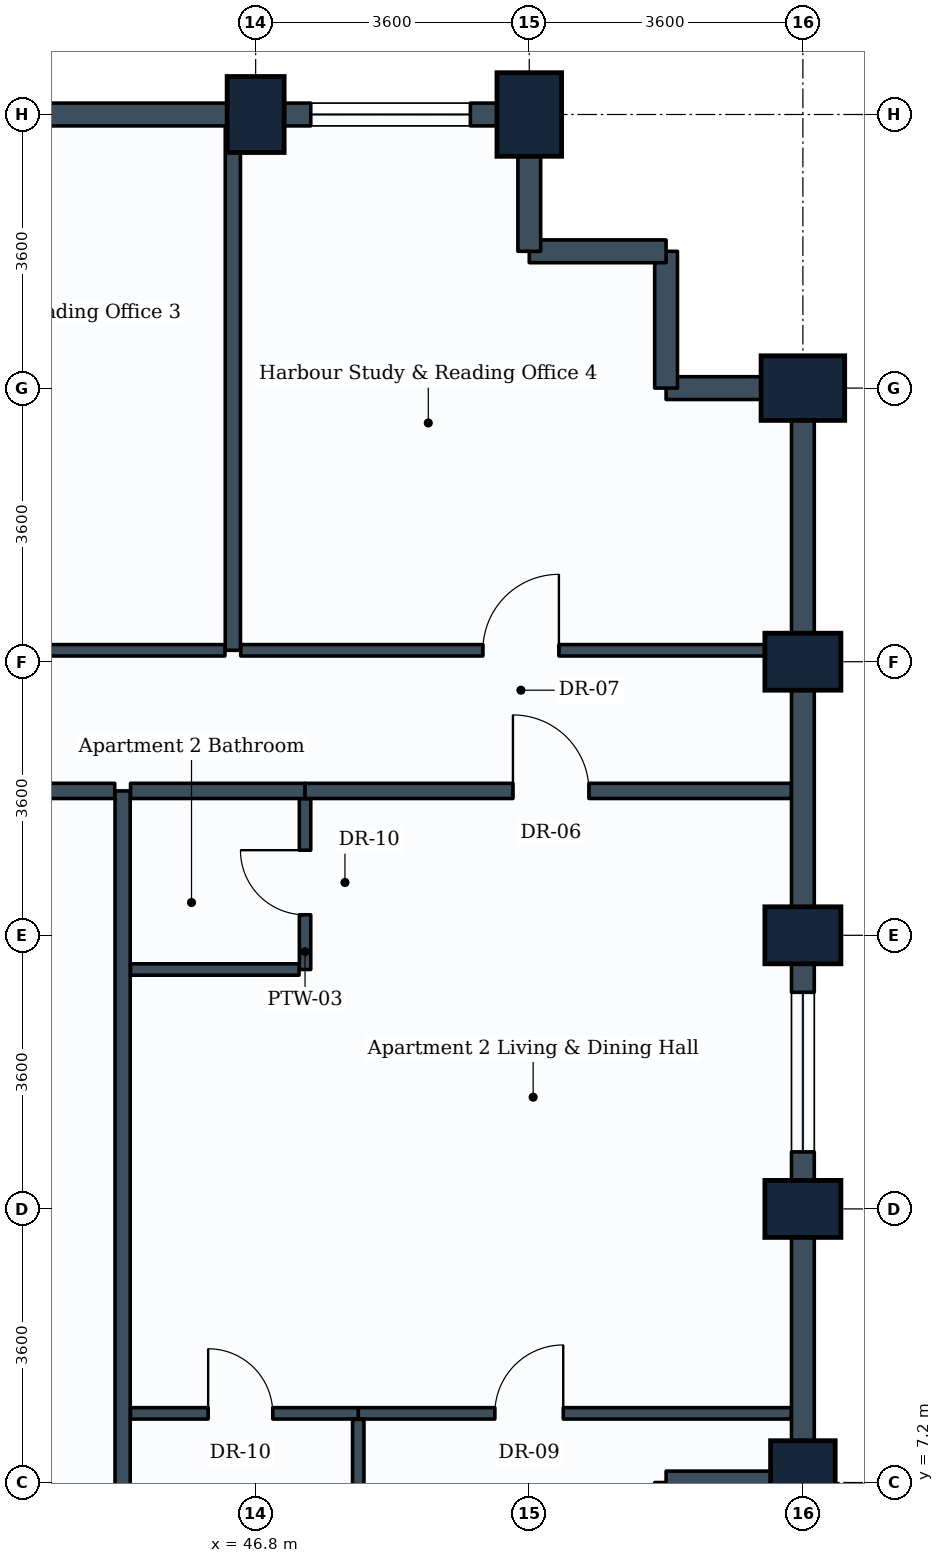
"""IFC4 building model, lengths in metres.
Left out: names, types, materials, properties, quantities, classifications, styles, units other than length and angle.
Written with IfcOpenShell. Run it as: python <this file> out.ifc"""

import sys

from ifc_helpers import new_model, si_unit, direction, frame, frame_2d, origin, origin_2d, place, context, subcontext, project, spatial, rectangle, extrude, element, fill, save


model = new_model("IFC4")
c1 = context("Model", 3, precision=1e-05, world=origin(), true_north=direction((0.0, 1.0)))
c2 = subcontext(c1, "Body", "Model", "MODEL_VIEW")
j1 = project(units=[si_unit("LENGTHUNIT", "METRE"), si_unit("PLANEANGLEUNIT", "RADIAN")], contexts=[c1])
p1 = place(None, origin())
s1 = spatial("IfcSite", under=j1, at=p1, CompositionType="ELEMENT")
p2 = place(p1, origin())
s2 = spatial("IfcBuilding", under=s1, at=p2, CompositionType="ELEMENT")
p3 = place(p2, frame((0.0, 0.0, 161.8)))
s3 = spatial("IfcBuildingStorey", under=s2, at=p3, CompositionType="ELEMENT", Elevation=161.8)
p4 = place(p3, frame((46.8, 25.2, 0.0), z_axis=(0.0, 0.0, 1.0), x_axis=(1.0, 0.0, 0.0)))
e1 = element("IfcColumn", 1, at=p4, inside=s3, PredefinedType="COLUMN", context=c2, shape_type="SweptSolid", body=[
    extrude(rectangle(XDim=0.75, YDim=1.0, at=origin_2d()), origin(), (0.0, 0.0, 1.0), 3.8),
])
for number, where, z_axis, x_axis in (
    (2, (50.4, 25.2, 0.0), (0.0, 0.0, 1.0), (1.0, 0.0, 0.0)),
    (3, (54.0, 7.2, 0.0), (0.0, 0.0, 1.0), (1.0, 0.0, 0.0)),
):
    element("IfcColumn", number, at=place(p3, frame(where, z_axis=z_axis, x_axis=x_axis)), inside=s3, PredefinedType="COLUMN", context=c2, shape_type="SweptSolid", body=[
        extrude(rectangle(XDim=0.85, YDim=1.1, at=origin_2d()), origin(), (0.0, 0.0, 1.0), 3.8),
    ])
for number, where, z_axis, x_axis in (
    (4, (54.0, 10.8, 0.0), (0.0, 0.0, 1.0), (0.0, 1.0, 0.0)),
    (5, (54.0, 14.4, 0.0), (0.0, 0.0, 1.0), (0.0, 1.0, 0.0)),
    (6, (54.0, 18.0, 0.0), (0.0, 0.0, 1.0), (0.0, 1.0, 0.0)),
):
    element("IfcColumn", number, at=place(p3, frame(where, z_axis=z_axis, x_axis=x_axis)), inside=s3, PredefinedType="COLUMN", context=c2, shape_type="SweptSolid", body=[
        extrude(rectangle(XDim=0.75, YDim=1.0, at=origin_2d()), origin(), (0.0, 0.0, 1.0), 3.8),
    ])
p5 = place(p3, frame((54.0, 21.6, 0.0), z_axis=(0.0, 0.0, 1.0), x_axis=(0.0, 1.0, 0.0)))
e7 = element("IfcColumn", 7, at=p5, inside=s3, PredefinedType="COLUMN", context=c2, shape_type="SweptSolid", body=[
    extrude(rectangle(XDim=0.85, YDim=1.1, at=origin_2d()), origin(), (0.0, 0.0, 1.0), 3.8),
])
p6 = place(p3, frame((52.2, 7.2, 0.0), z_axis=(0.0, 0.0, 1.0), x_axis=(0.0, -1.0, 0.0)))
e8 = element("IfcWall", 8, at=p6, inside=s3, PredefinedType="STANDARD", context=c2, shape_type="SweptSolid", body=[
    extrude(rectangle(XDim=1.8, YDim=0.3, at=frame_2d((0.9, 0.0))), origin(), (0.0, 0.0, 1.0), 3.535),
])
p7 = place(p3, frame((54.0, 7.2, 0.0), z_axis=(0.0, 0.0, 1.0), x_axis=(-1.0, 0.0, 0.0)))
e9 = element("IfcWall", 9, at=p7, inside=s3, PredefinedType="STANDARD", context=c2, shape_type="SweptSolid", body=[
    extrude(rectangle(XDim=1.8, YDim=0.3, at=frame_2d((0.9, 0.0))), origin(), (0.0, 0.0, 1.0), 2.93),
])
p8 = place(p3, frame((54.0, 10.8, 0.0), z_axis=(0.0, 0.0, 1.0), x_axis=(0.0, -1.0, 0.0)))
e10 = element("IfcWall", 10, at=p8, inside=s3, PredefinedType="STANDARD", context=c2, shape_type="SweptSolid", body=[
    extrude(rectangle(XDim=3.6, YDim=0.3, at=frame_2d((1.8, 0.0))), origin(), (0.0, 0.0, 1.0), 2.93),
])
p9 = place(p3, frame((54.0, 14.4, 0.0), z_axis=(0.0, 0.0, 1.0), x_axis=(0.0, -1.0, 0.0)))
e11 = element("IfcWall", 11, at=p9, inside=s3, PredefinedType="STANDARD", context=c2, shape_type="SweptSolid", body=[
    extrude(rectangle(XDim=3.6, YDim=0.3, at=frame_2d((1.8, 0.0))), origin(), (0.0, 0.0, 1.0), 2.93),
])
p10 = place(p9, frame((0.75, 0.0, 0.85)))
e12 = element("IfcOpeningElement", 12, at=p10, cuts=e11, PredefinedType="OPENING", context=c2, shape_type="SweptSolid", body=[
    extrude(rectangle(XDim=2.1, YDim=1.35, at=frame_2d((1.05, 0.675))), frame((0.0, 0.16, 0.0), z_axis=(0.0, -1.0, 0.0), x_axis=(1.0, 0.0, 0.0)), (0.0, 0.0, 1.0), 0.32),
])
for number, where, z_axis, x_axis in (
    (13, (54.0, 18.0, 0.0), (0.0, 0.0, 1.0), (0.0, -1.0, 0.0)),
    (14, (54.0, 21.6, 0.0), (0.0, 0.0, 1.0), (0.0, -1.0, 0.0)),
):
    element("IfcWall", number, at=place(p3, frame(where, z_axis=z_axis, x_axis=x_axis)), inside=s3, PredefinedType="STANDARD", context=c2, shape_type="SweptSolid", body=[
        extrude(rectangle(XDim=3.6, YDim=0.3, at=frame_2d((1.8, 0.0))), origin(), (0.0, 0.0, 1.0), 2.93),
    ])
p11 = place(p3, frame((52.2, 21.6, 0.0), z_axis=(0.0, 0.0, 1.0), x_axis=(1.0, 0.0, 0.0)))
e15 = element("IfcWall", 15, at=p11, inside=s3, PredefinedType="STANDARD", context=c2, shape_type="SweptSolid", body=[
    extrude(rectangle(XDim=1.8, YDim=0.3, at=frame_2d((0.9, 0.0))), origin(), (0.0, 0.0, 1.0), 2.93),
])
p12 = place(p3, frame((52.2, 23.4, 0.0), z_axis=(0.0, 0.0, 1.0), x_axis=(0.0, -1.0, 0.0)))
e16 = element("IfcWall", 16, at=p12, inside=s3, PredefinedType="STANDARD", context=c2, shape_type="SweptSolid", body=[
    extrude(rectangle(XDim=1.8, YDim=0.3, at=frame_2d((0.9, 0.0))), origin(), (0.0, 0.0, 1.0), 3.535),
])
p13 = place(p3, frame((50.4, 23.4, 0.0), z_axis=(0.0, 0.0, 1.0), x_axis=(1.0, 0.0, 0.0)))
e17 = element("IfcWall", 17, at=p13, inside=s3, PredefinedType="STANDARD", context=c2, shape_type="SweptSolid", body=[
    extrude(rectangle(XDim=1.8, YDim=0.3, at=frame_2d((0.9, 0.0))), origin(), (0.0, 0.0, 1.0), 3.535),
])
p14 = place(p3, frame((50.4, 25.2, 0.0), z_axis=(0.0, 0.0, 1.0), x_axis=(0.0, -1.0, 0.0)))
e18 = element("IfcWall", 18, at=p14, inside=s3, PredefinedType="STANDARD", context=c2, shape_type="SweptSolid", body=[
    extrude(rectangle(XDim=1.8, YDim=0.3, at=frame_2d((0.9, 0.0))), origin(), (0.0, 0.0, 1.0), 2.93),
])
p15 = place(p3, frame((46.8, 25.2, 0.0), z_axis=(0.0, 0.0, 1.0), x_axis=(1.0, 0.0, 0.0)))
e19 = element("IfcWall", 19, at=p15, inside=s3, PredefinedType="STANDARD", context=c2, shape_type="SweptSolid", body=[
    extrude(rectangle(XDim=3.6, YDim=0.3, at=frame_2d((1.8, 0.0))), origin(), (0.0, 0.0, 1.0), 2.93),
])
p16 = place(p15, frame((0.725, 0.0, 0.85)))
e20 = element("IfcOpeningElement", 20, at=p16, cuts=e19, PredefinedType="OPENING", context=c2, shape_type="SweptSolid", body=[
    extrude(rectangle(XDim=2.1, YDim=1.35, at=frame_2d((1.05, 0.675))), frame((0.0, 0.16, 0.0), z_axis=(0.0, -1.0, 0.0), x_axis=(1.0, 0.0, 0.0)), (0.0, 0.0, 1.0), 0.32),
])
p17 = place(p3, frame((43.2, 25.2, 0.0), z_axis=(0.0, 0.0, 1.0), x_axis=(1.0, 0.0, 0.0)))
e21 = element("IfcWall", 21, at=p17, inside=s3, PredefinedType="STANDARD", context=c2, shape_type="SweptSolid", body=[
    extrude(rectangle(XDim=3.6, YDim=0.3, at=frame_2d((1.8, 0.0))), origin(), (0.0, 0.0, 1.0), 2.93),
])
p18 = place(p3, frame((45.05, 3.754, 0.0), z_axis=(0.0, 0.0, 1.0), x_axis=(0.0, 1.0, 0.0)))
e22 = element("IfcWall", 22, at=p18, inside=s3, PredefinedType="PARTITIONING", context=c2, shape_type="SweptSolid", body=[
    extrude(rectangle(XDim=12.546, YDim=0.2, at=frame_2d((6.273, 0.0))), origin(), (0.0, 0.0, 1.0), 2.93),
])
p19 = place(p3, frame((36.8, 16.3, 0.0), z_axis=(0.0, 0.0, 1.0), x_axis=(1.0, 0.0, 0.0)))
e23 = element("IfcWall", 23, at=p19, inside=s3, PredefinedType="PARTITIONING", context=c2, shape_type="SweptSolid", body=[
    extrude(rectangle(XDim=8.146, YDim=0.2, at=frame_2d((4.073, 0.0))), origin(), (0.0, 0.0, 1.0), 3.17),
])
p20 = place(p19, frame((2.829, 0.0, 0.0)))
e24 = element("IfcOpeningElement", 24, at=p20, cuts=e23, PredefinedType="OPENING", context=c2, shape_type="SweptSolid", body=[
    extrude(rectangle(XDim=1.0, YDim=2.1, at=frame_2d((0.5, 1.05))), frame((0.0, 0.11, 0.0), z_axis=(0.0, -1.0, 0.0), x_axis=(1.0, 0.0, 0.0)), (0.0, 0.0, 1.0), 0.22),
])
p21 = place(p3, frame((45.154, 16.3, 0.0), z_axis=(0.0, 0.0, 1.0), x_axis=(1.0, 0.0, 0.0)))
e25 = element("IfcWall", 25, at=p21, inside=s3, PredefinedType="PARTITIONING", context=c2, shape_type="SweptSolid", body=[
    extrude(rectangle(XDim=2.296, YDim=0.2, at=frame_2d((1.148, 0.0))), origin(), (0.0, 0.0, 1.0), 3.17),
])
p22 = place(p3, frame((47.45, 13.95, 0.0), z_axis=(0.0, 0.0, 1.0), x_axis=(0.0, 1.0, 0.0)))
e26 = element("IfcWall", 26, at=p22, inside=s3, PredefinedType="PARTITIONING", context=c2, shape_type="SweptSolid", body=[
    extrude(rectangle(XDim=2.246, YDim=0.15, at=frame_2d((1.123, 0.0))), origin(), (0.0, 0.0, 1.0), 3.17),
])
p23 = place(p22, frame((0.72, 0.0, 0.0)))
e27 = element("IfcOpeningElement", 27, at=p23, cuts=e26, PredefinedType="OPENING", context=c2, shape_type="SweptSolid", body=[
    extrude(rectangle(XDim=0.85, YDim=2.1, at=frame_2d((0.425, 1.05))), frame((0.0, 0.085, 0.0), z_axis=(0.0, -1.0, 0.0), x_axis=(1.0, 0.0, 0.0)), (0.0, 0.0, 1.0), 0.17),
])
p24 = place(p3, frame((45.154, 13.95, 0.0), z_axis=(0.0, 0.0, 1.0), x_axis=(1.0, 0.0, 0.0)))
e28 = element("IfcWall", 28, at=p24, inside=s3, PredefinedType="PARTITIONING", context=c2, shape_type="SweptSolid", body=[
    extrude(rectangle(XDim=2.217, YDim=0.15, at=frame_2d((1.108, 0.0))), origin(), (0.0, 0.0, 1.0), 3.17),
])
p25 = place(p3, frame((47.45, 16.3, 0.0), z_axis=(0.0, 0.0, 1.0), x_axis=(1.0, 0.0, 0.0)))
e29 = element("IfcWall", 29, at=p25, inside=s3, PredefinedType="PARTITIONING", context=c2, shape_type="SweptSolid", body=[
    extrude(rectangle(XDim=6.396, YDim=0.2, at=frame_2d((3.198, 0.0))), origin(), (0.0, 0.0, 1.0), 2.93),
])
p26 = place(p25, frame((2.735, 0.0, 0.0)))
e30 = element("IfcOpeningElement", 30, at=p26, cuts=e29, PredefinedType="OPENING", context=c2, shape_type="SweptSolid", body=[
    extrude(rectangle(XDim=1.0, YDim=2.1, at=frame_2d((0.5, 1.05))), frame((0.0, 0.11, 0.0), z_axis=(0.0, -1.0, 0.0), x_axis=(1.0, 0.0, 0.0)), (0.0, 0.0, 1.0), 0.22),
])
p27 = place(p3, frame((48.15, 8.11, 0.0), z_axis=(0.0, 0.0, 1.0), x_axis=(1.0, 0.0, 0.0)))
e31 = element("IfcWall", 31, at=p27, inside=s3, PredefinedType="PARTITIONING", context=c2, shape_type="SweptSolid", body=[
    extrude(rectangle(XDim=5.696, YDim=0.15, at=frame_2d((2.848, 0.0))), origin(), (0.0, 0.0, 1.0), 2.93),
])
p28 = place(p27, frame((1.797, 0.0, 0.0)))
e32 = element("IfcOpeningElement", 32, at=p28, cuts=e31, PredefinedType="OPENING", context=c2, shape_type="SweptSolid", body=[
    extrude(rectangle(XDim=0.9, YDim=2.1, at=frame_2d((0.45, 1.05))), frame((0.0, 0.085, 0.0), z_axis=(0.0, -1.0, 0.0), x_axis=(1.0, 0.0, 0.0)), (0.0, 0.0, 1.0), 0.17),
])
p29 = place(p3, frame((45.154, 8.11, 0.0), z_axis=(0.0, 0.0, 1.0), x_axis=(1.0, 0.0, 0.0)))
e33 = element("IfcWall", 33, at=p29, inside=s3, PredefinedType="PARTITIONING", context=c2, shape_type="SweptSolid", body=[
    extrude(rectangle(XDim=2.996, YDim=0.15, at=frame_2d((1.498, 0.0))), origin(), (0.0, 0.0, 1.0), 3.17),
])
p30 = place(p29, frame((1.021, 0.0, 0.0)))
e34 = element("IfcOpeningElement", 34, at=p30, cuts=e33, PredefinedType="OPENING", context=c2, shape_type="SweptSolid", body=[
    extrude(rectangle(XDim=0.85, YDim=2.1, at=frame_2d((0.425, 1.05))), frame((0.0, 0.085, 0.0), z_axis=(0.0, -1.0, 0.0), x_axis=(1.0, 0.0, 0.0)), (0.0, 0.0, 1.0), 0.17),
])
p31 = place(p3, frame((48.15, 3.754, 0.0), z_axis=(0.0, 0.0, 1.0), x_axis=(0.0, 1.0, 0.0)))
e35 = element("IfcWall", 35, at=p31, inside=s3, PredefinedType="PARTITIONING", context=c2, shape_type="SweptSolid", body=[
    extrude(rectangle(XDim=4.277, YDim=0.15, at=frame_2d((2.139, 0.0))), origin(), (0.0, 0.0, 1.0), 2.93),
])
p32 = place(p3, frame((46.5, 18.15, 0.0), z_axis=(0.0, 0.0, 1.0), x_axis=(0.0, 1.0, 0.0)))
e36 = element("IfcWall", 36, at=p32, inside=s3, PredefinedType="PARTITIONING", context=c2, shape_type="SweptSolid", body=[
    extrude(rectangle(XDim=6.896, YDim=0.2, at=frame_2d((3.448, 0.0))), origin(), (0.0, 0.0, 1.0), 2.93),
])
p33 = place(p3, frame((39.0, 18.15, 0.0), z_axis=(0.0, 0.0, 1.0), x_axis=(1.0, 0.0, 0.0)))
e37 = element("IfcWall", 37, at=p33, inside=s3, PredefinedType="PARTITIONING", context=c2, shape_type="SweptSolid", body=[
    extrude(rectangle(XDim=7.396, YDim=0.15, at=frame_2d((3.698, 0.0))), origin(), (0.0, 0.0, 1.0), 3.17),
])
p34 = place(p33, frame((3.29, 0.0, 0.0)))
e38 = element("IfcOpeningElement", 38, at=p34, cuts=e37, PredefinedType="OPENING", context=c2, shape_type="SweptSolid", body=[
    extrude(rectangle(XDim=1.0, YDim=2.1, at=frame_2d((0.5, 1.05))), frame((0.0, 0.085, 0.0), z_axis=(0.0, -1.0, 0.0), x_axis=(1.0, 0.0, 0.0)), (0.0, 0.0, 1.0), 0.17),
])
p35 = place(p3, frame((46.604, 18.15, 0.0), z_axis=(0.0, 0.0, 1.0), x_axis=(1.0, 0.0, 0.0)))
e39 = element("IfcWall", 39, at=p35, inside=s3, PredefinedType="PARTITIONING", context=c2, shape_type="SweptSolid", body=[
    extrude(rectangle(XDim=7.242, YDim=0.15, at=frame_2d((3.621, 0.0))), origin(), (0.0, 0.0, 1.0), 2.93),
])
p36 = place(p35, frame((3.186, 0.0, 0.0)))
e40 = element("IfcOpeningElement", 40, at=p36, cuts=e39, PredefinedType="OPENING", context=c2, shape_type="SweptSolid", body=[
    extrude(rectangle(XDim=1.0, YDim=2.1, at=frame_2d((0.5, 1.05))), frame((0.0, 0.085, 0.0), z_axis=(0.0, -1.0, 0.0), x_axis=(1.0, 0.0, 0.0)), (0.0, 0.0, 1.0), 0.17),
])
p37 = place(p10, origin())
e41 = element("IfcWindow", 41, at=p37, inside=s3, PartitioningType="SINGLE_PANEL", PredefinedType="WINDOW", context=c2, shape_type="SweptSolid", body=[
    extrude(rectangle(XDim=2.1, YDim=1.35, at=frame_2d((1.05, 0.675))), frame((0.0, 0.03, 0.0), z_axis=(0.0, -1.0, 0.0), x_axis=(1.0, 0.0, 0.0)), (0.0, 0.0, 1.0), 0.06),
])
fill(e12, e41)
p38 = place(p16, origin())
e42 = element("IfcWindow", 42, at=p38, inside=s3, PartitioningType="SINGLE_PANEL", PredefinedType="WINDOW", context=c2, shape_type="SweptSolid", body=[
    extrude(rectangle(XDim=2.1, YDim=1.35, at=frame_2d((1.05, 0.675))), frame((0.0, 0.03, 0.0), z_axis=(0.0, -1.0, 0.0), x_axis=(1.0, 0.0, 0.0)), (0.0, 0.0, 1.0), 0.06),
])
fill(e20, e42)
p39 = place(p23, origin())
e43 = element("IfcDoor", 43, at=p39, inside=s3, OperationType="SINGLE_SWING_RIGHT", PredefinedType="DOOR", context=c2, shape_type="SweptSolid", body=[
    extrude(rectangle(XDim=0.85, YDim=2.1, at=frame_2d((0.425, 1.05))), frame((0.0, 0.025, 0.0), z_axis=(0.0, -1.0, 0.0), x_axis=(1.0, 0.0, 0.0)), (0.0, 0.0, 1.0), 0.05),
])
fill(e27, e43)
p40 = place(p26, origin())
e44 = element("IfcDoor", 44, at=p40, inside=s3, OperationType="SINGLE_SWING_LEFT", PredefinedType="DOOR", context=c2, shape_type="SweptSolid", body=[
    extrude(rectangle(XDim=1.0, YDim=2.1, at=frame_2d((0.5, 1.05))), frame((0.0, 0.025, 0.0), z_axis=(0.0, -1.0, 0.0), x_axis=(1.0, 0.0, 0.0)), (0.0, 0.0, 1.0), 0.05),
])
fill(e30, e44)
p41 = place(p28, origin())
e45 = element("IfcDoor", 45, at=p41, inside=s3, OperationType="SINGLE_SWING_RIGHT", PredefinedType="DOOR", context=c2, shape_type="SweptSolid", body=[
    extrude(rectangle(XDim=0.9, YDim=2.1, at=frame_2d((0.45, 1.05))), frame((0.0, 0.025, 0.0), z_axis=(0.0, -1.0, 0.0), x_axis=(1.0, 0.0, 0.0)), (0.0, 0.0, 1.0), 0.05),
])
fill(e32, e45)
p42 = place(p30, origin())
e46 = element("IfcDoor", 46, at=p42, inside=s3, OperationType="SINGLE_SWING_LEFT", PredefinedType="DOOR", context=c2, shape_type="SweptSolid", body=[
    extrude(rectangle(XDim=0.85, YDim=2.1, at=frame_2d((0.425, 1.05))), frame((0.0, 0.025, 0.0), z_axis=(0.0, -1.0, 0.0), x_axis=(1.0, 0.0, 0.0)), (0.0, 0.0, 1.0), 0.05),
])
fill(e34, e46)
p43 = place(p36, origin())
e47 = element("IfcDoor", 47, at=p43, inside=s3, OperationType="SINGLE_SWING_RIGHT", PredefinedType="DOOR", context=c2, shape_type="SweptSolid", body=[
    extrude(rectangle(XDim=1.0, YDim=2.1, at=frame_2d((0.5, 1.05))), frame((0.0, 0.025, 0.0), z_axis=(0.0, -1.0, 0.0), x_axis=(1.0, 0.0, 0.0)), (0.0, 0.0, 1.0), 0.05),
])
fill(e40, e47)
save(model, sys.argv[1])
